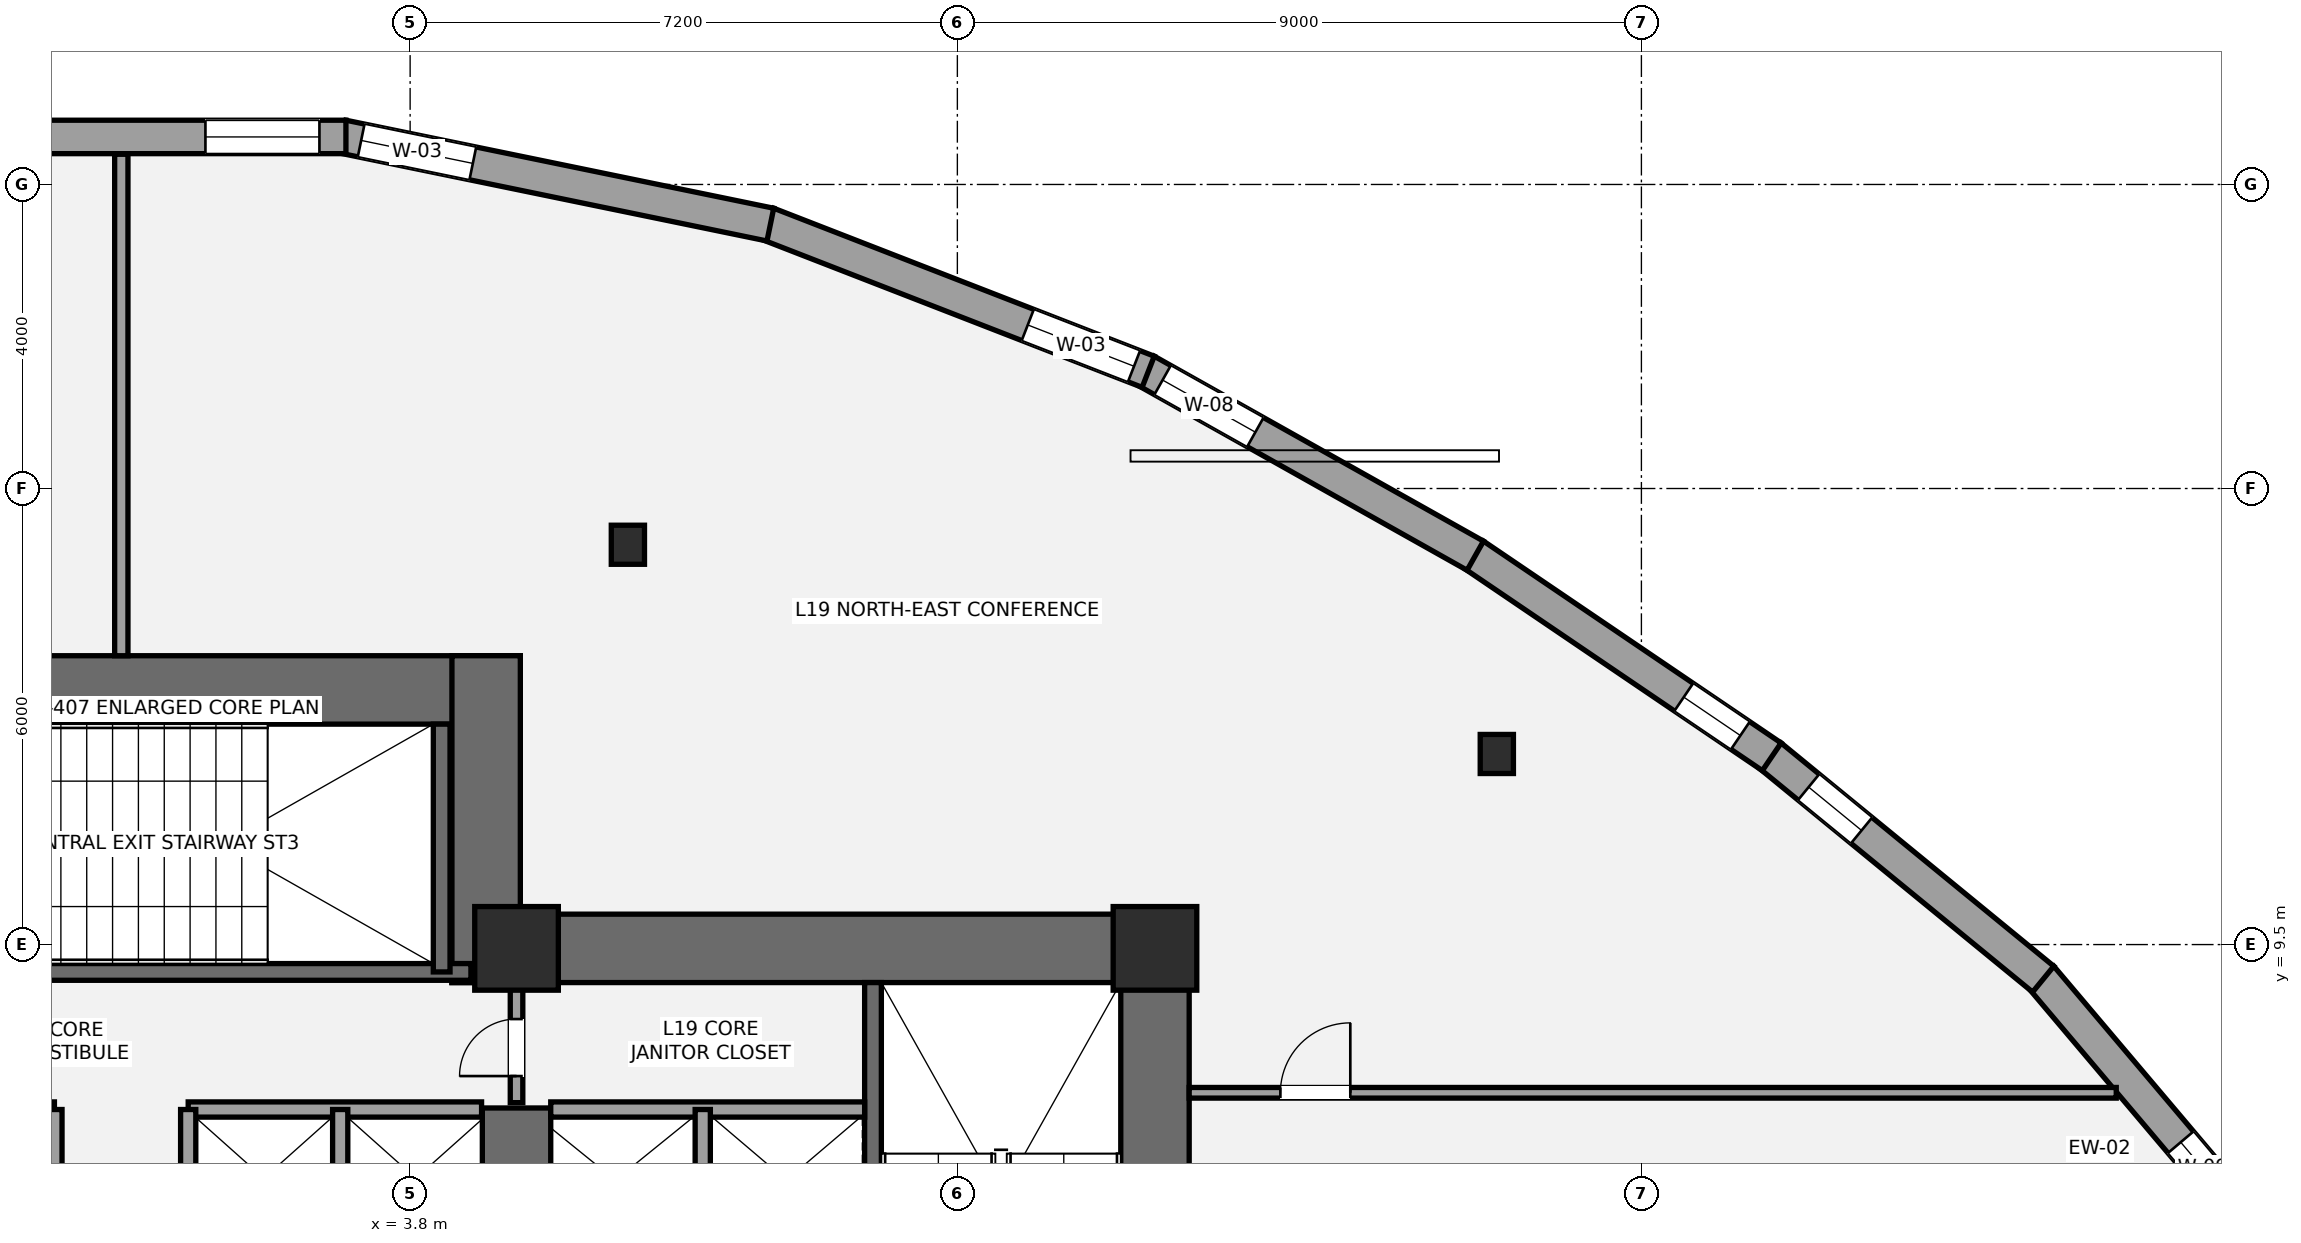
"""IFC4 building model, lengths in metres.
Left out: names, types, materials, properties, quantities, classifications, styles, units other than length and angle.
Written with IfcOpenShell. Run it as: python <this file> out.ifc"""

import sys

from ifc_helpers import new_model, si_unit, direction, frame, frame_2d, origin, origin_2d, place, context, subcontext, project, spatial, rectangle, i_section, extrude, element, fill, save


model = new_model("IFC4")
c1 = context("Model", 3, precision=1e-05, world=origin(), true_north=direction((0.0, 1.0)))
c2 = subcontext(c1, "Body", "Model", "MODEL_VIEW")
j1 = project(units=[si_unit("LENGTHUNIT", "METRE"), si_unit("PLANEANGLEUNIT", "RADIAN")], contexts=[c1])
p1 = place(None, origin())
s1 = spatial("IfcSite", under=j1, at=p1, CompositionType="ELEMENT")
p2 = place(p1, origin())
s2 = spatial("IfcBuilding", under=s1, at=p2, CompositionType="ELEMENT")
p3 = place(p2, frame((0.0, 0.0, 73.8)))
s3 = spatial("IfcBuildingStorey", under=s2, at=p3, CompositionType="ELEMENT", Elevation=73.8)
p4 = place(p3, frame((13.6, 0.95, 0.0), z_axis=(0.0, 0.0, 1.0), x_axis=(0.0, 1.0, 0.0)))
e1 = element("IfcWall", 1, at=p4, inside=s3, PredefinedType="SHEAR", context=c2, shape_type="SweptSolid", body=[
    extrude(rectangle(XDim=8.95, YDim=0.9, at=frame_2d((4.475, 0.0))), origin(), (0.0, 0.0, 1.0), 3.6),
])
p5 = place(p3, frame((4.35, 9.45, 0.0), z_axis=(0.0, 0.0, 1.0), x_axis=(1.0, 0.0, 0.0)))
e2 = element("IfcWall", 2, at=p5, inside=s3, PredefinedType="SHEAR", context=c2, shape_type="SweptSolid", body=[
    extrude(rectangle(XDim=9.7, YDim=0.9, at=frame_2d((4.85, 0.0))), origin(), (0.0, 0.0, 1.0), 3.6),
])
p6 = place(p3, frame((5.2, 5.35, 0.0), z_axis=(0.0, 0.0, 1.0), x_axis=(0.0, 1.0, 0.0)))
e3 = element("IfcWall", 3, at=p6, inside=s3, PredefinedType="SHEAR", context=c2, shape_type="SweptSolid", body=[
    extrude(rectangle(XDim=2.0, YDim=0.9, at=frame_2d((1.0, 0.0))), origin(), (0.0, 0.0, 1.0), 3.6),
])
p7 = place(p3, frame((9.89, 1.85, 0.0), z_axis=(0.0, 0.0, 1.0), x_axis=(0.0, 1.0, 0.0)))
e4 = element("IfcWall", 4, at=p7, inside=s3, PredefinedType="SHEAR", context=c2, shape_type="SweptSolid", body=[
    extrude(rectangle(XDim=7.15, YDim=0.22, at=frame_2d((3.575, 0.0))), origin(), (0.0, 0.0, 1.0), 3.6),
])
p8 = place(p3, frame((-5.25, 12.85, 0.0), z_axis=(0.0, 0.0, 1.0), x_axis=(1.0, 0.0, 0.0)))
e5 = element("IfcWall", 5, at=p8, inside=s3, PredefinedType="SHEAR", context=c2, shape_type="SweptSolid", body=[
    extrude(rectangle(XDim=10.5, YDim=0.9, at=frame_2d((5.25, 0.0))), origin(), (0.0, 0.0, 1.0), 3.6),
])
p9 = place(p3, frame((4.8, 9.0, 0.0), z_axis=(0.0, 0.0, 1.0), x_axis=(0.0, 1.0, 0.0)))
e6 = element("IfcWall", 6, at=p9, inside=s3, PredefinedType="SHEAR", context=c2, shape_type="SweptSolid", body=[
    extrude(rectangle(XDim=4.3, YDim=0.9, at=frame_2d((2.15, 0.0))), origin(), (0.0, 0.0, 1.0), 3.6),
])
p10 = place(p3, frame((-4.7, 9.14, 0.0), z_axis=(0.0, 0.0, 1.0), x_axis=(1.0, 0.0, 0.0)))
e7 = element("IfcWall", 7, at=p10, inside=s3, PredefinedType="SHEAR", context=c2, shape_type="SweptSolid", body=[
    extrude(rectangle(XDim=9.3, YDim=0.22, at=frame_2d((4.65, 0.0))), origin(), (0.0, 0.0, 1.0), 3.6),
])
p11 = place(p10, frame((1.15, 0.0, 0.0)))
e8 = element("IfcOpeningElement", 8, at=p11, cuts=e7, PredefinedType="OPENING", context=c2, shape_type="SweptSolid", body=[
    extrude(rectangle(XDim=1.05, YDim=2.15, at=frame_2d((0.525, 1.075))), frame((0.0, 0.12, 0.0), z_axis=(0.0, -1.0, 0.0), x_axis=(1.0, 0.0, 0.0)), (0.0, 0.0, 1.0), 0.24),
])
p12 = place(p3, frame((4.215, 9.14, 0.0), z_axis=(0.0, 0.0, 1.0), x_axis=(0.0, 1.0, 0.0)))
e9 = element("IfcWall", 9, at=p12, inside=s3, PredefinedType="SHEAR", context=c2, shape_type="SweptSolid", body=[
    extrude(rectangle(XDim=3.26, YDim=0.22, at=frame_2d((1.63, 0.0))), origin(), (0.0, 0.0, 1.0), 3.6),
])
for number, where, z_axis, x_axis in (
    (10, (5.2, 9.45, 0.0), (0.0, 0.0, 1.0), (1.0, 0.0, 0.0)),
    (11, (13.6, 9.45, 0.0), (0.0, 0.0, 1.0), (1.0, 0.0, 0.0)),
):
    element("IfcColumn", number, at=place(p3, frame(where, z_axis=z_axis, x_axis=x_axis)), inside=s3, PredefinedType="COLUMN", context=c2, shape_type="SweptSolid", body=[
        extrude(rectangle(XDim=1.1, YDim=1.1, at=origin_2d()), origin(), (0.0, 0.0, 1.0), 3.6),
    ])
for number, where, z_axis, x_axis in (
    (12, (18.098, 12.007, 0.0), (0.0, 0.0, 1.0), (1.0, 0.0, 0.0)),
    (13, (6.665, 14.76, 0.0), (0.0, 0.0, 1.0), (1.0, 0.0, 0.0)),
):
    element("IfcColumn", number, at=place(p3, frame(where, z_axis=z_axis, x_axis=x_axis)), inside=s3, PredefinedType="COLUMN", context=c2, shape_type="SweptSolid", body=[
        extrude(i_section(OverallWidth=0.437, OverallDepth=0.514, WebThickness=0.061, FlangeThickness=0.097, at=origin_2d()), origin(), (0.0, 0.0, 1.0), 3.6),
    ])
p13 = place(p3, frame((25.258, 9.073, 0.0), z_axis=(0.0, 0.0, 1.0), x_axis=(0.645698517297, -0.763592446767, 0.0)))
e14 = element("IfcWall", 14, at=p13, inside=s3, PredefinedType="STANDARD", context=c2, shape_type="SweptSolid", body=[
    extrude(rectangle(XDim=4.446, YDim=0.44, at=frame_2d((2.223, 0.0))), origin(), (0.0, 0.0, 1.0), 2.489),
])
p14 = place(p13, frame((2.847, 0.0, 0.58)))
e15 = element("IfcOpeningElement", 15, at=p14, cuts=e14, PredefinedType="OPENING", context=c2, shape_type="SweptSolid", body=[
    extrude(rectangle(XDim=0.9, YDim=1.35, at=frame_2d((0.45, 0.675))), frame((0.0, 0.23, 0.0), z_axis=(0.0, -1.0, 0.0), x_axis=(1.0, 0.0, 0.0)), (0.0, 0.0, 1.0), 0.46),
])
p15 = place(p3, frame((21.699, 11.982, 0.0), z_axis=(0.0, 0.0, 1.0), x_axis=(0.7737766342, -0.63345853879, 0.0)))
e16 = element("IfcWall", 16, at=p15, inside=s3, PredefinedType="STANDARD", context=c2, shape_type="SweptSolid", body=[
    extrude(rectangle(XDim=4.637, YDim=0.44, at=frame_2d((2.318, 0.0))), origin(), (0.0, 0.0, 1.0), 2.489),
])
p16 = place(p15, frame((0.648, 0.0, 0.58)))
e17 = element("IfcOpeningElement", 17, at=p16, cuts=e16, PredefinedType="OPENING", context=c2, shape_type="SweptSolid", body=[
    extrude(rectangle(XDim=0.9, YDim=1.35, at=frame_2d((0.45, 0.675))), frame((0.0, 0.23, 0.0), z_axis=(0.0, -1.0, 0.0), x_axis=(1.0, 0.0, 0.0)), (0.0, 0.0, 1.0), 0.46),
])
p17 = place(p3, frame((17.799, 14.626, 0.0), z_axis=(0.0, 0.0, 1.0), x_axis=(0.827650405372, -0.561243981249, 0.0)))
e18 = element("IfcWall", 18, at=p17, inside=s3, PredefinedType="STANDARD", context=c2, shape_type="SweptSolid", body=[
    extrude(rectangle(XDim=4.731, YDim=0.44, at=frame_2d((2.366, 0.0))), origin(), (0.0, 0.0, 1.0), 2.493),
])
p18 = place(p17, frame((3.333, 0.0, 0.58)))
e19 = element("IfcOpeningElement", 19, at=p18, cuts=e18, PredefinedType="OPENING", context=c2, shape_type="SweptSolid", body=[
    extrude(rectangle(XDim=0.9, YDim=1.35, at=frame_2d((0.45, 0.675))), frame((0.0, 0.23, 0.0), z_axis=(0.0, -1.0, 0.0), x_axis=(1.0, 0.0, 0.0)), (0.0, 0.0, 1.0), 0.46),
])
p19 = place(p3, frame((13.483, 17.049, 0.0), z_axis=(0.0, 0.0, 1.0), x_axis=(0.871887714573, -0.489705843519, 0.0)))
e20 = element("IfcWall", 20, at=p19, inside=s3, PredefinedType="STANDARD", context=c2, shape_type="SweptSolid", body=[
    extrude(rectangle(XDim=4.968, YDim=0.44, at=frame_2d((2.484, 0.0))), origin(), (0.0, 0.0, 1.0), 2.489),
])
p20 = place(p19, frame((0.25, 0.0, 0.45)))
e21 = element("IfcOpeningElement", 21, at=p20, cuts=e20, PredefinedType="OPENING", context=c2, shape_type="SweptSolid", body=[
    extrude(rectangle(XDim=1.4, YDim=1.55, at=frame_2d((0.7, 0.775))), frame((0.0, 0.23, 0.0), z_axis=(0.0, -1.0, 0.0), x_axis=(1.0, 0.0, 0.0)), (0.0, 0.0, 1.0), 0.46),
])
p21 = place(p3, frame((8.504, 18.982, 0.0), z_axis=(0.0, 0.0, 1.0), x_axis=(0.932040489001, -0.362354145641, 0.0)))
e22 = element("IfcWall", 22, at=p21, inside=s3, PredefinedType="STANDARD", context=c2, shape_type="SweptSolid", body=[
    extrude(rectangle(XDim=5.372, YDim=0.44, at=frame_2d((2.686, 0.0))), origin(), (0.0, 0.0, 1.0), 2.489),
])
p22 = place(p21, frame((3.672, 0.0, 0.48)))
e23 = element("IfcOpeningElement", 23, at=p22, cuts=e22, PredefinedType="OPENING", context=c2, shape_type="SweptSolid", body=[
    extrude(rectangle(XDim=1.5, YDim=1.7, at=frame_2d((0.75, 0.85))), frame((0.0, 0.23, 0.0), z_axis=(0.0, -1.0, 0.0), x_axis=(1.0, 0.0, 0.0)), (0.0, 0.0, 1.0), 0.46),
])
p23 = place(p3, frame((2.911, 20.13, 0.0), z_axis=(0.0, 0.0, 1.0), x_axis=(0.979485663347, -0.201513858821, 0.0)))
e24 = element("IfcWall", 24, at=p23, inside=s3, PredefinedType="STANDARD", context=c2, shape_type="SweptSolid", body=[
    extrude(rectangle(XDim=5.746, YDim=0.44, at=frame_2d((2.873, 0.0))), origin(), (0.0, 0.0, 1.0), 2.489),
])
p24 = place(p23, frame((0.25, 0.0, 0.65)))
e25 = element("IfcOpeningElement", 25, at=p24, cuts=e24, PredefinedType="OPENING", context=c2, shape_type="SweptSolid", body=[
    extrude(rectangle(XDim=1.5, YDim=1.7, at=frame_2d((0.75, 0.85))), frame((0.0, 0.23, 0.0), z_axis=(0.0, -1.0, 0.0), x_axis=(1.0, 0.0, 0.0)), (0.0, 0.0, 1.0), 0.46),
])
p25 = place(p3, frame((-2.955, 20.125, 0.0), z_axis=(0.0, 0.0, 1.0), x_axis=(1.0, 0.0, 0.0)))
e26 = element("IfcWall", 26, at=p25, inside=s3, PredefinedType="STANDARD", context=c2, shape_type="SweptSolid", body=[
    extrude(rectangle(XDim=5.91, YDim=0.44, at=frame_2d((2.955, 0.0))), origin(), (0.0, 0.0, 1.0), 2.493),
])
p26 = place(p25, frame((4.062, 0.0, 0.65)))
e27 = element("IfcOpeningElement", 27, at=p26, cuts=e26, PredefinedType="OPENING", context=c2, shape_type="SweptSolid", body=[
    extrude(rectangle(XDim=1.5, YDim=1.7, at=frame_2d((0.75, 0.85))), frame((0.0, 0.23, 0.0), z_axis=(0.0, -1.0, 0.0), x_axis=(1.0, 0.0, 0.0)), (0.0, 0.0, 1.0), 0.46),
])
p27 = place(p3, frame((5.65, 7.33, 0.0), z_axis=(0.0, 0.0, 1.0), x_axis=(1.0, 0.0, 0.0)))
e28 = element("IfcWall", 28, at=p27, inside=s3, PredefinedType="SOLIDWALL", context=c2, shape_type="SweptSolid", body=[
    extrude(rectangle(XDim=4.13, YDim=0.2, at=frame_2d((2.065, 0.0))), origin(), (0.0, 0.0, 1.0), 3.36),
])
p28 = place(p3, frame((7.65, 5.47, 0.0), z_axis=(0.0, 0.0, 1.0), x_axis=(0.0, 1.0, 0.0)))
e29 = element("IfcWall", 29, at=p28, inside=s3, PredefinedType="SOLIDWALL", context=c2, shape_type="SweptSolid", body=[
    extrude(rectangle(XDim=1.86, YDim=0.2, at=frame_2d((0.93, 0.0))), origin(), (0.0, 0.0, 1.0), 3.36),
])
for number, where, z_axis, x_axis in (
    (30, (-4.74, 7.33, 0.0), (0.0, 0.0, 1.0), (1.0, 0.0, 0.0)),
    (31, (0.88, 7.33, 0.0), (0.0, 0.0, 1.0), (1.0, 0.0, 0.0)),
):
    element("IfcWall", number, at=place(p3, frame(where, z_axis=z_axis, x_axis=x_axis)), inside=s3, PredefinedType="SOLIDWALL", context=c2, shape_type="SweptSolid", body=[
        extrude(rectangle(XDim=3.86, YDim=0.2, at=frame_2d((1.93, 0.0))), origin(), (0.0, 0.0, 1.0), 3.36),
    ])
for number, where, z_axis, x_axis in (
    (32, (2.88, 5.52, 0.0), (0.0, 0.0, 1.0), (0.0, 1.0, 0.0)),
    (33, (-0.88, 5.52, 0.0), (0.0, 0.0, 1.0), (0.0, 1.0, 0.0)),
    (34, (0.88, 5.52, 0.0), (0.0, 0.0, 1.0), (0.0, 1.0, 0.0)),
):
    element("IfcWall", number, at=place(p3, frame(where, z_axis=z_axis, x_axis=x_axis)), inside=s3, PredefinedType="SOLIDWALL", context=c2, shape_type="SweptSolid", body=[
        extrude(rectangle(XDim=1.81, YDim=0.2, at=frame_2d((0.905, 0.0))), origin(), (0.0, 0.0, 1.0), 3.36),
    ])
p29 = place(p3, frame((5.2, 7.42, 0.0), z_axis=(0.0, 0.0, 1.0), x_axis=(0.0, 1.0, 0.0)))
e35 = element("IfcWall", 35, at=p29, inside=s3, PredefinedType="PARTITIONING", context=c2, shape_type="SweptSolid", body=[
    extrude(rectangle(XDim=1.58, YDim=0.165, at=frame_2d((0.79, 0.0))), origin(), (0.0, 0.0, 1.0), 3.36),
])
p30 = place(p29, frame((0.35, 0.0, 0.0)))
e36 = element("IfcOpeningElement", 36, at=p30, cuts=e35, PredefinedType="OPENING", context=c2, shape_type="SweptSolid", body=[
    extrude(rectangle(XDim=0.75, YDim=2.1, at=frame_2d((0.375, 1.05))), frame((0.0, 0.093, 0.0), z_axis=(0.0, -1.0, 0.0), x_axis=(1.0, 0.0, 0.0)), (0.0, 0.0, 1.0), 0.185),
])
p31 = place(p3, frame((14.05, 7.55, 0.0), z_axis=(0.0, 0.0, 1.0), x_axis=(1.0, 0.0, 0.0)))
e37 = element("IfcWall", 37, at=p31, inside=s3, PredefinedType="PARTITIONING", context=c2, shape_type="SweptSolid", body=[
    extrude(rectangle(XDim=12.198, YDim=0.14, at=frame_2d((6.099, 0.0))), origin(), (0.0, 0.0, 1.0), 2.813),
])
p32 = place(p31, frame((1.2, 0.0, 0.0)))
e38 = element("IfcOpeningElement", 38, at=p32, cuts=e37, PredefinedType="OPENING", context=c2, shape_type="SweptSolid", body=[
    extrude(rectangle(XDim=0.92, YDim=2.15, at=frame_2d((0.46, 1.075))), frame((0.0, 0.08, 0.0), z_axis=(0.0, -1.0, 0.0), x_axis=(1.0, 0.0, 0.0)), (0.0, 0.0, 1.0), 0.16),
])
p33 = place(p3, frame((0.0, 13.3, 0.0), z_axis=(0.0, 0.0, 1.0), x_axis=(0.0, 1.0, 0.0)))
e39 = element("IfcWall", 39, at=p33, inside=s3, PredefinedType="PARTITIONING", context=c2, shape_type="SweptSolid", body=[
    extrude(rectangle(XDim=6.597, YDim=0.175, at=frame_2d((3.299, 0.0))), origin(), (0.0, 0.0, 1.0), 3.36),
])
p34 = place(p14, origin())
e40 = element("IfcWindow", 40, at=p34, inside=s3, PartitioningType="SINGLE_PANEL", PredefinedType="WINDOW", context=c2, shape_type="SweptSolid", body=[
    extrude(rectangle(XDim=0.9, YDim=1.35, at=frame_2d((0.45, 0.675))), frame((0.0, -0.01, 0.0), z_axis=(0.0, -1.0, 0.0), x_axis=(1.0, 0.0, 0.0)), (0.0, 0.0, 1.0), 0.06),
])
fill(e15, e40)
p35 = place(p16, origin())
e41 = element("IfcWindow", 41, at=p35, inside=s3, PartitioningType="SINGLE_PANEL", PredefinedType="WINDOW", context=c2, shape_type="SweptSolid", body=[
    extrude(rectangle(XDim=0.9, YDim=1.35, at=frame_2d((0.45, 0.675))), frame((0.0, -0.01, 0.0), z_axis=(0.0, -1.0, 0.0), x_axis=(1.0, 0.0, 0.0)), (0.0, 0.0, 1.0), 0.06),
])
fill(e17, e41)
p36 = place(p18, origin())
e42 = element("IfcWindow", 42, at=p36, inside=s3, PartitioningType="SINGLE_PANEL", PredefinedType="WINDOW", context=c2, shape_type="SweptSolid", body=[
    extrude(rectangle(XDim=0.9, YDim=1.35, at=frame_2d((0.45, 0.675))), frame((0.0, -0.01, 0.0), z_axis=(0.0, -1.0, 0.0), x_axis=(1.0, 0.0, 0.0)), (0.0, 0.0, 1.0), 0.06),
])
fill(e19, e42)
p37 = place(p20, origin())
e43 = element("IfcWindow", 43, at=p37, inside=s3, PartitioningType="SINGLE_PANEL", PredefinedType="WINDOW", context=c2, shape_type="SweptSolid", body=[
    extrude(rectangle(XDim=1.4, YDim=1.55, at=frame_2d((0.7, 0.775))), frame((0.0, -0.01, 0.0), z_axis=(0.0, -1.0, 0.0), x_axis=(1.0, 0.0, 0.0)), (0.0, 0.0, 1.0), 0.06),
])
fill(e21, e43)
p38 = place(p22, origin())
e44 = element("IfcWindow", 44, at=p38, inside=s3, PartitioningType="SINGLE_PANEL", PredefinedType="WINDOW", context=c2, shape_type="SweptSolid", body=[
    extrude(rectangle(XDim=1.5, YDim=1.7, at=frame_2d((0.75, 0.85))), frame((0.0, -0.01, 0.0), z_axis=(0.0, -1.0, 0.0), x_axis=(1.0, 0.0, 0.0)), (0.0, 0.0, 1.0), 0.06),
])
fill(e23, e44)
p39 = place(p24, origin())
e45 = element("IfcWindow", 45, at=p39, inside=s3, PartitioningType="SINGLE_PANEL", PredefinedType="WINDOW", context=c2, shape_type="SweptSolid", body=[
    extrude(rectangle(XDim=1.5, YDim=1.7, at=frame_2d((0.75, 0.85))), frame((0.0, -0.01, 0.0), z_axis=(0.0, -1.0, 0.0), x_axis=(1.0, 0.0, 0.0)), (0.0, 0.0, 1.0), 0.06),
])
fill(e25, e45)
p40 = place(p26, origin())
e46 = element("IfcWindow", 46, at=p40, inside=s3, PartitioningType="SINGLE_PANEL", PredefinedType="WINDOW", context=c2, shape_type="SweptSolid", body=[
    extrude(rectangle(XDim=1.5, YDim=1.7, at=frame_2d((0.75, 0.85))), frame((0.0, -0.01, 0.0), z_axis=(0.0, -1.0, 0.0), x_axis=(1.0, 0.0, 0.0)), (0.0, 0.0, 1.0), 0.06),
])
fill(e27, e46)
p41 = place(p30, origin())
e47 = element("IfcDoor", 47, at=p41, inside=s3, OperationType="SINGLE_SWING_LEFT", PredefinedType="DOOR", context=c2, shape_type="SweptSolid", body=[
    extrude(rectangle(XDim=0.75, YDim=2.1, at=frame_2d((0.375, 1.05))), frame((0.0, 0.025, 0.0), z_axis=(0.0, -1.0, 0.0), x_axis=(1.0, 0.0, 0.0)), (0.0, 0.0, 1.0), 0.05),
])
fill(e36, e47)
p42 = place(p32, origin())
e48 = element("IfcDoor", 48, at=p42, inside=s3, OperationType="SINGLE_SWING_RIGHT", PredefinedType="DOOR", context=c2, shape_type="SweptSolid", body=[
    extrude(rectangle(XDim=0.92, YDim=2.15, at=frame_2d((0.46, 1.075))), frame((0.0, 0.025, 0.0), z_axis=(0.0, -1.0, 0.0), x_axis=(1.0, 0.0, 0.0)), (0.0, 0.0, 1.0), 0.05),
])
fill(e38, e48)
save(model, sys.argv[1])
